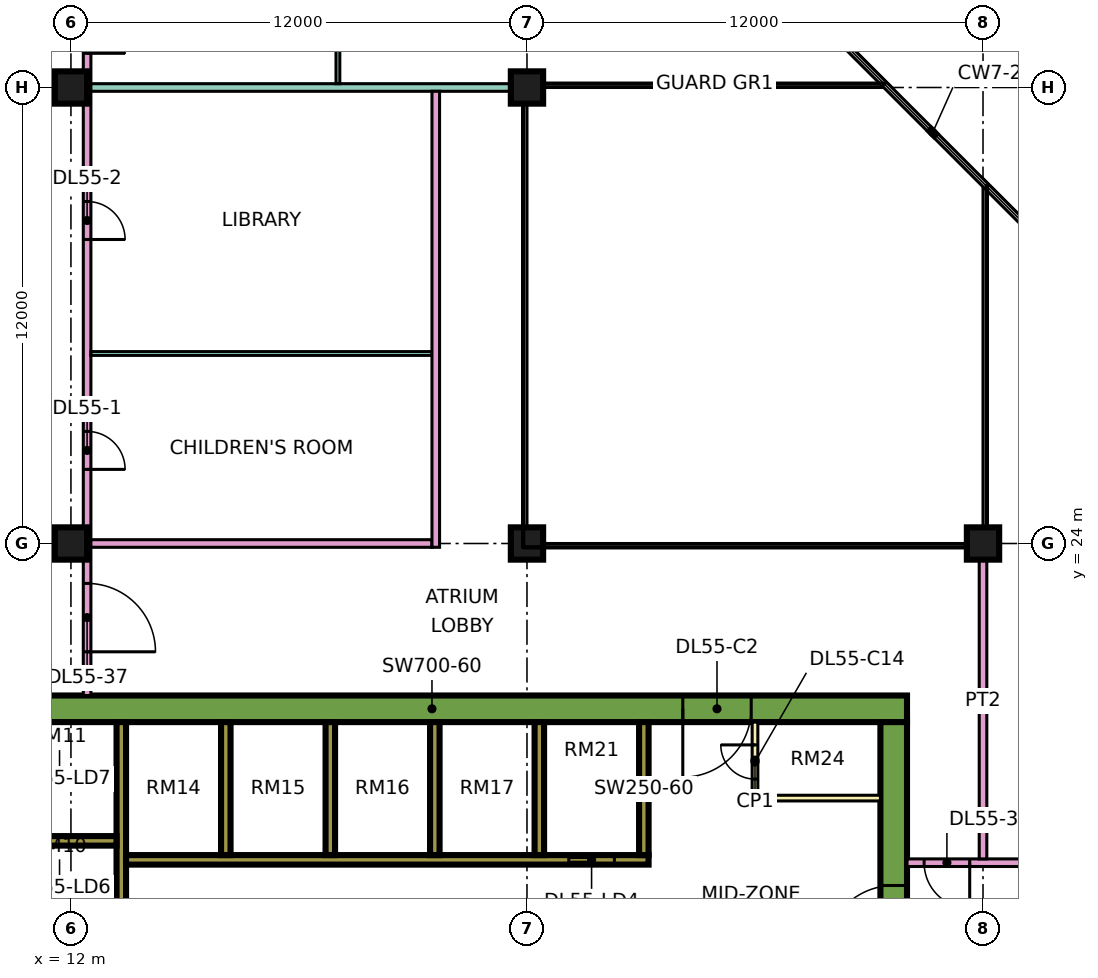
"""IFC4 building model, lengths in metres.
Left out: names, types, materials, properties, quantities, classifications, styles, units other than length and angle.
Written with IfcOpenShell. Run it as: python <this file> out.ifc"""

import sys

from ifc_helpers import new_model, si_unit, direction, frame, frame_2d, origin, origin_2d, place, context, subcontext, project, spatial, rectangle, extrude, element, fill, save


model = new_model("IFC4")
c1 = context("Model", 3, precision=1e-05, world=origin(), true_north=direction((0.0, 1.0)))
c2 = subcontext(c1, "Body", "Model", "MODEL_VIEW")
j1 = project(units=[si_unit("LENGTHUNIT", "METRE"), si_unit("PLANEANGLEUNIT", "RADIAN")], contexts=[c1])
p1 = place(None, origin())
s1 = spatial("IfcSite", under=j1, at=p1, CompositionType="ELEMENT")
p2 = place(p1, origin())
s2 = spatial("IfcBuilding", under=s1, at=p2, CompositionType="ELEMENT")
p3 = place(p2, frame((0.0, 0.0, 234.15)))
s3 = spatial("IfcBuildingStorey", under=s2, at=p3, CompositionType="ELEMENT", Elevation=234.15)
for number, where, z_axis, x_axis in (
    (1, (12.0, 24.0, 0.0), (0.0, 0.0, 1.0), (1.0, 0.0, 0.0)),
    (2, (12.0, 36.0, 0.0), (0.0, 0.0, 1.0), (1.0, 0.0, 0.0)),
    (3, (24.0, 24.0, 0.0), (0.0, 0.0, 1.0), (1.0, 0.0, 0.0)),
    (4, (24.0, 36.0, 0.0), (0.0, 0.0, 1.0), (1.0, 0.0, 0.0)),
    (5, (36.0, 24.0, 0.0), (0.0, 0.0, 1.0), (1.0, 0.0, 0.0)),
):
    element("IfcColumn", number, at=place(p3, frame(where, z_axis=z_axis, x_axis=x_axis)), inside=s3, PredefinedType="COLUMN", context=c2, shape_type="SweptSolid", body=[
        extrude(rectangle(XDim=0.85, YDim=0.85, at=origin_2d()), origin(), (0.0, 0.0, 1.0), 3.75),
    ])
p4 = place(p3, frame((9.0, 19.65, 0.0), z_axis=(0.0, 0.0, 1.0), x_axis=(1.0, 0.0, 0.0)))
e6 = element("IfcWall", 6, at=p4, inside=s3, PredefinedType="SHEAR", context=c2, shape_type="SweptSolid", body=[
    extrude(rectangle(XDim=25.0, YDim=0.7, at=frame_2d((12.5, 0.0))), origin(), (0.0, 0.0, 1.0), 3.75),
])
p5 = place(p4, frame((19.1, 0.0, 0.0)))
e7 = element("IfcOpeningElement", 7, at=p5, cuts=e6, PredefinedType="OPENING", context=c2, shape_type="SweptSolid", body=[
    extrude(rectangle(XDim=1.8, YDim=2.4, at=frame_2d((0.9, 1.2))), frame((0.0, 0.36, 0.0), z_axis=(0.0, -1.0, 0.0), x_axis=(1.0, 0.0, 0.0)), (0.0, 0.0, 1.0), 0.72),
])
p6 = place(p3, frame((33.65, 7.7, 0.0), z_axis=(0.0, 0.0, 1.0), x_axis=(0.0, 1.0, 0.0)))
e8 = element("IfcWall", 8, at=p6, inside=s3, PredefinedType="SHEAR", context=c2, shape_type="SweptSolid", body=[
    extrude(rectangle(XDim=11.6, YDim=0.7, at=frame_2d((5.8, 0.0))), origin(), (0.0, 0.0, 1.0), 3.75),
])
p7 = place(p6, frame((5.5, 0.0, 0.0)))
e9 = element("IfcOpeningElement", 9, at=p7, cuts=e8, PredefinedType="OPENING", context=c2, shape_type="SweptSolid", body=[
    extrude(rectangle(XDim=1.8, YDim=2.4, at=frame_2d((0.9, 1.2))), frame((0.0, 0.36, 0.0), z_axis=(0.0, -1.0, 0.0), x_axis=(1.0, 0.0, 0.0)), (0.0, 0.0, 1.0), 0.72),
])
p8 = place(p3, frame((13.325, 7.7, 0.0), z_axis=(0.0, 0.0, 1.0), x_axis=(0.0, 1.0, 0.0)))
e10 = element("IfcWall", 10, at=p8, inside=s3, PredefinedType="SHEAR", context=c2, shape_type="SweptSolid", body=[
    extrude(rectangle(XDim=11.6, YDim=0.25, at=frame_2d((5.8, 0.0))), origin(), (0.0, 0.0, 1.0), 3.75),
])
p9 = place(p3, frame((13.45, 15.675, 0.0), z_axis=(0.0, 0.0, 1.0), x_axis=(1.0, 0.0, 0.0)))
e11 = element("IfcWall", 11, at=p9, inside=s3, PredefinedType="SHEAR", context=c2, shape_type="SweptSolid", body=[
    extrude(rectangle(XDim=13.75, YDim=0.25, at=frame_2d((6.875, 0.0))), origin(), (0.0, 0.0, 1.0), 3.75),
])
p10 = place(p9, frame((11.65, 0.0, 0.0)))
e12 = element("IfcOpeningElement", 12, at=p10, cuts=e11, PredefinedType="OPENING", context=c2, shape_type="SweptSolid", body=[
    extrude(rectangle(XDim=1.2, YDim=2.2, at=frame_2d((0.6, 1.1))), frame((0.0, 0.135, 0.0), z_axis=(0.0, -1.0, 0.0), x_axis=(1.0, 0.0, 0.0)), (0.0, 0.0, 1.0), 0.27),
])
p11 = place(p3, frame((10.2, 16.175, 0.0), z_axis=(0.0, 0.0, 1.0), x_axis=(1.0, 0.0, 0.0)))
e13 = element("IfcWall", 13, at=p11, inside=s3, PredefinedType="SHEAR", context=c2, shape_type="SweptSolid", body=[
    extrude(rectangle(XDim=3.0, YDim=0.25, at=frame_2d((1.5, 0.0))), origin(), (0.0, 0.0, 1.0), 3.75),
])
for number, where, z_axis, x_axis in (
    (14, (16.075, 15.8, 0.0), (0.0, 0.0, 1.0), (0.0, 1.0, 0.0)),
    (15, (18.825, 15.8, 0.0), (0.0, 0.0, 1.0), (0.0, 1.0, 0.0)),
    (16, (21.575, 15.8, 0.0), (0.0, 0.0, 1.0), (0.0, 1.0, 0.0)),
    (17, (24.325, 15.8, 0.0), (0.0, 0.0, 1.0), (0.0, 1.0, 0.0)),
    (18, (27.075, 15.8, 0.0), (0.0, 0.0, 1.0), (0.0, 1.0, 0.0)),
):
    element("IfcWall", number, at=place(p3, frame(where, z_axis=z_axis, x_axis=x_axis)), inside=s3, PredefinedType="SHEAR", context=c2, shape_type="SweptSolid", body=[
        extrude(rectangle(XDim=3.5, YDim=0.25, at=frame_2d((1.75, 0.0))), origin(), (0.0, 0.0, 1.0), 3.75),
    ])
p12 = place(p3, frame((30.0, 17.3, 0.0), z_axis=(0.0, 0.0, 1.0), x_axis=(0.0, 1.0, 0.0)))
e19 = element("IfcWall", 19, at=p12, inside=s3, PredefinedType="PARTITIONING", context=c2, shape_type="SweptSolid", body=[
    extrude(rectangle(XDim=2.0, YDim=0.15, at=frame_2d((1.0, 0.0))), origin(), (0.0, 0.0, 1.0), 3.35),
])
p13 = place(p12, frame((0.5, 0.0, 0.0)))
e20 = element("IfcOpeningElement", 20, at=p13, cuts=e19, PredefinedType="OPENING", context=c2, shape_type="SweptSolid", body=[
    extrude(rectangle(XDim=0.9, YDim=2.1, at=frame_2d((0.45, 1.05))), frame((0.0, 0.085, 0.0), z_axis=(0.0, -1.0, 0.0), x_axis=(1.0, 0.0, 0.0)), (0.0, 0.0, 1.0), 0.17),
])
p14 = place(p3, frame((30.0, 17.3, 0.0), z_axis=(0.0, 0.0, 1.0), x_axis=(1.0, 0.0, 0.0)))
e21 = element("IfcWall", 21, at=p14, inside=s3, PredefinedType="PARTITIONING", context=c2, shape_type="SweptSolid", body=[
    extrude(rectangle(XDim=3.3, YDim=0.15, at=frame_2d((1.65, 0.0))), origin(), (0.0, 0.0, 1.0), 3.35),
])
p15 = place(p3, frame((12.425, 20.0, 0.0), z_axis=(0.0, 0.0, 1.0), x_axis=(0.0, 1.0, 0.0)))
e22 = element("IfcWall", 22, at=p15, inside=s3, PredefinedType="PARTITIONING", context=c2, shape_type="SweptSolid", body=[
    extrude(rectangle(XDim=43.0, YDim=0.2, at=frame_2d((21.5, 0.0))), origin(), (0.0, 0.0, 1.0), 3.35),
])
p16 = place(p15, frame((5.95, 0.0, 0.0)))
e23 = element("IfcOpeningElement", 23, at=p16, cuts=e22, PredefinedType="OPENING", context=c2, shape_type="SweptSolid", body=[
    extrude(rectangle(XDim=1.0, YDim=2.1, at=frame_2d((0.5, 1.05))), frame((0.0, 0.11, 0.0), z_axis=(0.0, -1.0, 0.0), x_axis=(1.0, 0.0, 0.0)), (0.0, 0.0, 1.0), 0.22),
])
p17 = place(p15, frame((12.0, 0.0, 0.0)))
e24 = element("IfcOpeningElement", 24, at=p17, cuts=e22, PredefinedType="OPENING", context=c2, shape_type="SweptSolid", body=[
    extrude(rectangle(XDim=1.0, YDim=2.1, at=frame_2d((0.5, 1.05))), frame((0.0, 0.11, 0.0), z_axis=(0.0, -1.0, 0.0), x_axis=(1.0, 0.0, 0.0)), (0.0, 0.0, 1.0), 0.22),
])
p18 = place(p15, frame((16.9, 0.0, 0.0)))
e25 = element("IfcOpeningElement", 25, at=p18, cuts=e22, PredefinedType="OPENING", context=c2, shape_type="SweptSolid", body=[
    extrude(rectangle(XDim=1.0, YDim=2.1, at=frame_2d((0.5, 1.05))), frame((0.0, 0.11, 0.0), z_axis=(0.0, -1.0, 0.0), x_axis=(1.0, 0.0, 0.0)), (0.0, 0.0, 1.0), 0.22),
])
p19 = place(p15, frame((41.05, 0.0, 0.0)))
e26 = element("IfcOpeningElement", 26, at=p19, cuts=e22, PredefinedType="OPENING", context=c2, shape_type="SweptSolid", body=[
    extrude(rectangle(XDim=1.0, YDim=2.1, at=frame_2d((0.5, 1.05))), frame((0.0, 0.11, 0.0), z_axis=(0.0, -1.0, 0.0), x_axis=(1.0, 0.0, 0.0)), (0.0, 0.0, 1.0), 0.22),
])
p20 = place(p15, frame((1.15, 0.0, 0.0)))
e27 = element("IfcOpeningElement", 27, at=p20, cuts=e22, PredefinedType="OPENING", context=c2, shape_type="SweptSolid", body=[
    extrude(rectangle(XDim=1.8, YDim=2.1, at=frame_2d((0.9, 1.05))), frame((0.0, 0.11, 0.0), z_axis=(0.0, -1.0, 0.0), x_axis=(1.0, 0.0, 0.0)), (0.0, 0.0, 1.0), 0.22),
])
p21 = place(p15, frame((28.6, 0.0, 0.0)))
e28 = element("IfcOpeningElement", 28, at=p21, cuts=e22, PredefinedType="OPENING", context=c2, shape_type="SweptSolid", body=[
    extrude(rectangle(XDim=1.8, YDim=2.1, at=frame_2d((0.9, 1.05))), frame((0.0, 0.11, 0.0), z_axis=(0.0, -1.0, 0.0), x_axis=(1.0, 0.0, 0.0)), (0.0, 0.0, 1.0), 0.22),
])
p22 = place(p3, frame((12.525, 24.0, 0.0), z_axis=(0.0, 0.0, 1.0), x_axis=(1.0, 0.0, 0.0)))
e29 = element("IfcWall", 29, at=p22, inside=s3, PredefinedType="PARTITIONING", context=c2, shape_type="SweptSolid", body=[
    extrude(rectangle(XDim=8.975, YDim=0.2, at=frame_2d((4.488, 0.0))), origin(), (0.0, 0.0, 1.0), 3.35),
])
p23 = place(p3, frame((12.525, 29.0, 0.0), z_axis=(0.0, 0.0, 1.0), x_axis=(1.0, 0.0, 0.0)))
e30 = element("IfcWall", 30, at=p23, inside=s3, PredefinedType="PARTITIONING", context=c2, shape_type="SweptSolid", body=[
    extrude(rectangle(XDim=8.975, YDim=0.1, at=frame_2d((4.488, 0.0))), origin(), (0.0, 0.0, 1.0), 3.35),
])
p24 = place(p3, frame((12.525, 36.0, 0.0), z_axis=(0.0, 0.0, 1.0), x_axis=(1.0, 0.0, 0.0)))
e31 = element("IfcWall", 31, at=p24, inside=s3, PredefinedType="PARTITIONING", context=c2, shape_type="SweptSolid", body=[
    extrude(rectangle(XDim=11.475, YDim=0.2, at=frame_2d((5.738, 0.0))), origin(), (0.0, 0.0, 1.0), 3.35),
])
p25 = place(p3, frame((19.025, 36.1, 0.0), z_axis=(0.0, 0.0, 1.0), x_axis=(0.0, 1.0, 0.0)))
e32 = element("IfcWall", 32, at=p25, inside=s3, PredefinedType="PARTITIONING", context=c2, shape_type="SweptSolid", body=[
    extrude(rectangle(XDim=5.95, YDim=0.1, at=frame_2d((2.975, 0.0))), origin(), (0.0, 0.0, 1.0), 3.35),
])
p26 = place(p25, frame((0.95, 0.0, 0.0)))
e33 = element("IfcOpeningElement", 33, at=p26, cuts=e32, PredefinedType="OPENING", context=c2, shape_type="SweptSolid", body=[
    extrude(rectangle(XDim=0.9, YDim=2.1, at=frame_2d((0.45, 1.05))), frame((0.0, 0.06, 0.0), z_axis=(0.0, -1.0, 0.0), x_axis=(1.0, 0.0, 0.0)), (0.0, 0.0, 1.0), 0.12),
])
p27 = place(p25, frame((3.95, 0.0, 0.0)))
e34 = element("IfcOpeningElement", 34, at=p27, cuts=e32, PredefinedType="OPENING", context=c2, shape_type="SweptSolid", body=[
    extrude(rectangle(XDim=0.9, YDim=2.1, at=frame_2d((0.45, 1.05))), frame((0.0, 0.06, 0.0), z_axis=(0.0, -1.0, 0.0), x_axis=(1.0, 0.0, 0.0)), (0.0, 0.0, 1.0), 0.12),
])
p28 = place(p3, frame((21.6, 23.9, 0.0), z_axis=(0.0, 0.0, 1.0), x_axis=(0.0, 1.0, 0.0)))
e35 = element("IfcWall", 35, at=p28, inside=s3, PredefinedType="PARTITIONING", context=c2, shape_type="SweptSolid", body=[
    extrude(rectangle(XDim=12.0, YDim=0.2, at=frame_2d((6.0, 0.0))), origin(), (0.0, 0.0, 1.0), 3.35),
])
p29 = place(p3, frame((34.0, 15.6, 0.0), z_axis=(0.0, 0.0, 1.0), x_axis=(1.0, 0.0, 0.0)))
e36 = element("IfcWall", 36, at=p29, inside=s3, PredefinedType="PARTITIONING", context=c2, shape_type="SweptSolid", body=[
    extrude(rectangle(XDim=10.35, YDim=0.2, at=frame_2d((5.175, 0.0))), origin(), (0.0, 0.0, 1.0), 3.35),
])
p30 = place(p29, frame((5.6, 0.0, 0.0)))
e37 = element("IfcOpeningElement", 37, at=p30, cuts=e36, PredefinedType="OPENING", context=c2, shape_type="SweptSolid", body=[
    extrude(rectangle(XDim=1.0, YDim=2.1, at=frame_2d((0.5, 1.05))), frame((0.0, 0.11, 0.0), z_axis=(0.0, -1.0, 0.0), x_axis=(1.0, 0.0, 0.0)), (0.0, 0.0, 1.0), 0.22),
])
p31 = place(p29, frame((0.45, 0.0, 0.0)))
e38 = element("IfcOpeningElement", 38, at=p31, cuts=e36, PredefinedType="OPENING", context=c2, shape_type="SweptSolid", body=[
    extrude(rectangle(XDim=1.2, YDim=2.1, at=frame_2d((0.6, 1.05))), frame((0.0, 0.11, 0.0), z_axis=(0.0, -1.0, 0.0), x_axis=(1.0, 0.0, 0.0)), (0.0, 0.0, 1.0), 0.22),
])
p32 = place(p3, frame((36.0, 15.7, 0.0), z_axis=(0.0, 0.0, 1.0), x_axis=(0.0, 1.0, 0.0)))
e39 = element("IfcWall", 39, at=p32, inside=s3, PredefinedType="PARTITIONING", context=c2, shape_type="SweptSolid", body=[
    extrude(rectangle(XDim=8.3, YDim=0.2, at=frame_2d((4.15, 0.0))), origin(), (0.0, 0.0, 1.0), 3.35),
])
p33 = place(p10, origin())
e40 = element("IfcDoor", 40, at=p33, inside=s3, OperationType="DOUBLE_DOOR_SLIDING", PredefinedType="DOOR", context=c2, shape_type="SweptSolid", body=[
    extrude(rectangle(XDim=1.2, YDim=2.2, at=frame_2d((0.6, 1.1))), frame((0.0, 0.025, 0.0), z_axis=(0.0, -1.0, 0.0), x_axis=(1.0, 0.0, 0.0)), (0.0, 0.0, 1.0), 0.05),
])
fill(e12, e40)
p34 = place(p7, origin())
e41 = element("IfcDoor", 41, at=p34, inside=s3, OperationType="DOUBLE_DOOR_SINGLE_SWING", PredefinedType="DOOR", context=c2, shape_type="SweptSolid", body=[
    extrude(rectangle(XDim=1.8, YDim=2.4, at=frame_2d((0.9, 1.2))), frame((0.0, 0.025, 0.0), z_axis=(0.0, -1.0, 0.0), x_axis=(1.0, 0.0, 0.0)), (0.0, 0.0, 1.0), 0.05),
])
fill(e9, e41)
p35 = place(p5, frame((1.8, 0.0, 0.0), z_axis=(0.0, 0.0, 1.0), x_axis=(-1.0, 0.0, 0.0)))
e42 = element("IfcDoor", 42, at=p35, inside=s3, OperationType="DOUBLE_DOOR_SINGLE_SWING", PredefinedType="DOOR", context=c2, shape_type="SweptSolid", body=[
    extrude(rectangle(XDim=1.8, YDim=2.4, at=frame_2d((0.9, 1.2))), frame((0.0, 0.025, 0.0), z_axis=(0.0, -1.0, 0.0), x_axis=(1.0, 0.0, 0.0)), (0.0, 0.0, 1.0), 0.05),
])
fill(e7, e42)
p36 = place(p13, frame((0.9, 0.0, 0.0), z_axis=(0.0, 0.0, 1.0), x_axis=(-1.0, 0.0, 0.0)))
e43 = element("IfcDoor", 43, at=p36, inside=s3, OperationType="SINGLE_SWING_RIGHT", PredefinedType="DOOR", context=c2, shape_type="SweptSolid", body=[
    extrude(rectangle(XDim=0.9, YDim=2.1, at=frame_2d((0.45, 1.05))), frame((0.0, 0.025, 0.0), z_axis=(0.0, -1.0, 0.0), x_axis=(1.0, 0.0, 0.0)), (0.0, 0.0, 1.0), 0.05),
])
fill(e20, e43)
p37 = place(p16, frame((1.0, 0.0, 0.0), z_axis=(0.0, 0.0, 1.0), x_axis=(-1.0, 0.0, 0.0)))
e44 = element("IfcDoor", 44, at=p37, inside=s3, OperationType="SINGLE_SWING_LEFT", PredefinedType="DOOR", context=c2, shape_type="SweptSolid", body=[
    extrude(rectangle(XDim=1.0, YDim=2.1, at=frame_2d((0.5, 1.05))), frame((0.0, 0.025, 0.0), z_axis=(0.0, -1.0, 0.0), x_axis=(1.0, 0.0, 0.0)), (0.0, 0.0, 1.0), 0.05),
])
fill(e23, e44)
p38 = place(p17, frame((1.0, 0.0, 0.0), z_axis=(0.0, 0.0, 1.0), x_axis=(-1.0, 0.0, 0.0)))
e45 = element("IfcDoor", 45, at=p38, inside=s3, OperationType="SINGLE_SWING_LEFT", PredefinedType="DOOR", context=c2, shape_type="SweptSolid", body=[
    extrude(rectangle(XDim=1.0, YDim=2.1, at=frame_2d((0.5, 1.05))), frame((0.0, 0.025, 0.0), z_axis=(0.0, -1.0, 0.0), x_axis=(1.0, 0.0, 0.0)), (0.0, 0.0, 1.0), 0.05),
])
fill(e24, e45)
p39 = place(p18, frame((1.0, 0.0, 0.0), z_axis=(0.0, 0.0, 1.0), x_axis=(-1.0, 0.0, 0.0)))
e46 = element("IfcDoor", 46, at=p39, inside=s3, OperationType="SINGLE_SWING_LEFT", PredefinedType="DOOR", context=c2, shape_type="SweptSolid", body=[
    extrude(rectangle(XDim=1.0, YDim=2.1, at=frame_2d((0.5, 1.05))), frame((0.0, 0.025, 0.0), z_axis=(0.0, -1.0, 0.0), x_axis=(1.0, 0.0, 0.0)), (0.0, 0.0, 1.0), 0.05),
])
fill(e25, e46)
p40 = place(p31, origin())
e47 = element("IfcDoor", 47, at=p40, inside=s3, OperationType="SINGLE_SWING_RIGHT", PredefinedType="DOOR", context=c2, shape_type="SweptSolid", body=[
    extrude(rectangle(XDim=1.2, YDim=2.1, at=frame_2d((0.6, 1.05))), frame((0.0, 0.025, 0.0), z_axis=(0.0, -1.0, 0.0), x_axis=(1.0, 0.0, 0.0)), (0.0, 0.0, 1.0), 0.05),
])
fill(e38, e47)
p41 = place(p20, frame((1.8, 0.0, 0.0), z_axis=(0.0, 0.0, 1.0), x_axis=(-1.0, 0.0, 0.0)))
e48 = element("IfcDoor", 48, at=p41, inside=s3, OperationType="DOUBLE_DOOR_SINGLE_SWING", PredefinedType="DOOR", context=c2, shape_type="SweptSolid", body=[
    extrude(rectangle(XDim=1.8, YDim=2.1, at=frame_2d((0.9, 1.05))), frame((0.0, 0.025, 0.0), z_axis=(0.0, -1.0, 0.0), x_axis=(1.0, 0.0, 0.0)), (0.0, 0.0, 1.0), 0.05),
])
fill(e27, e48)
save(model, sys.argv[1])
